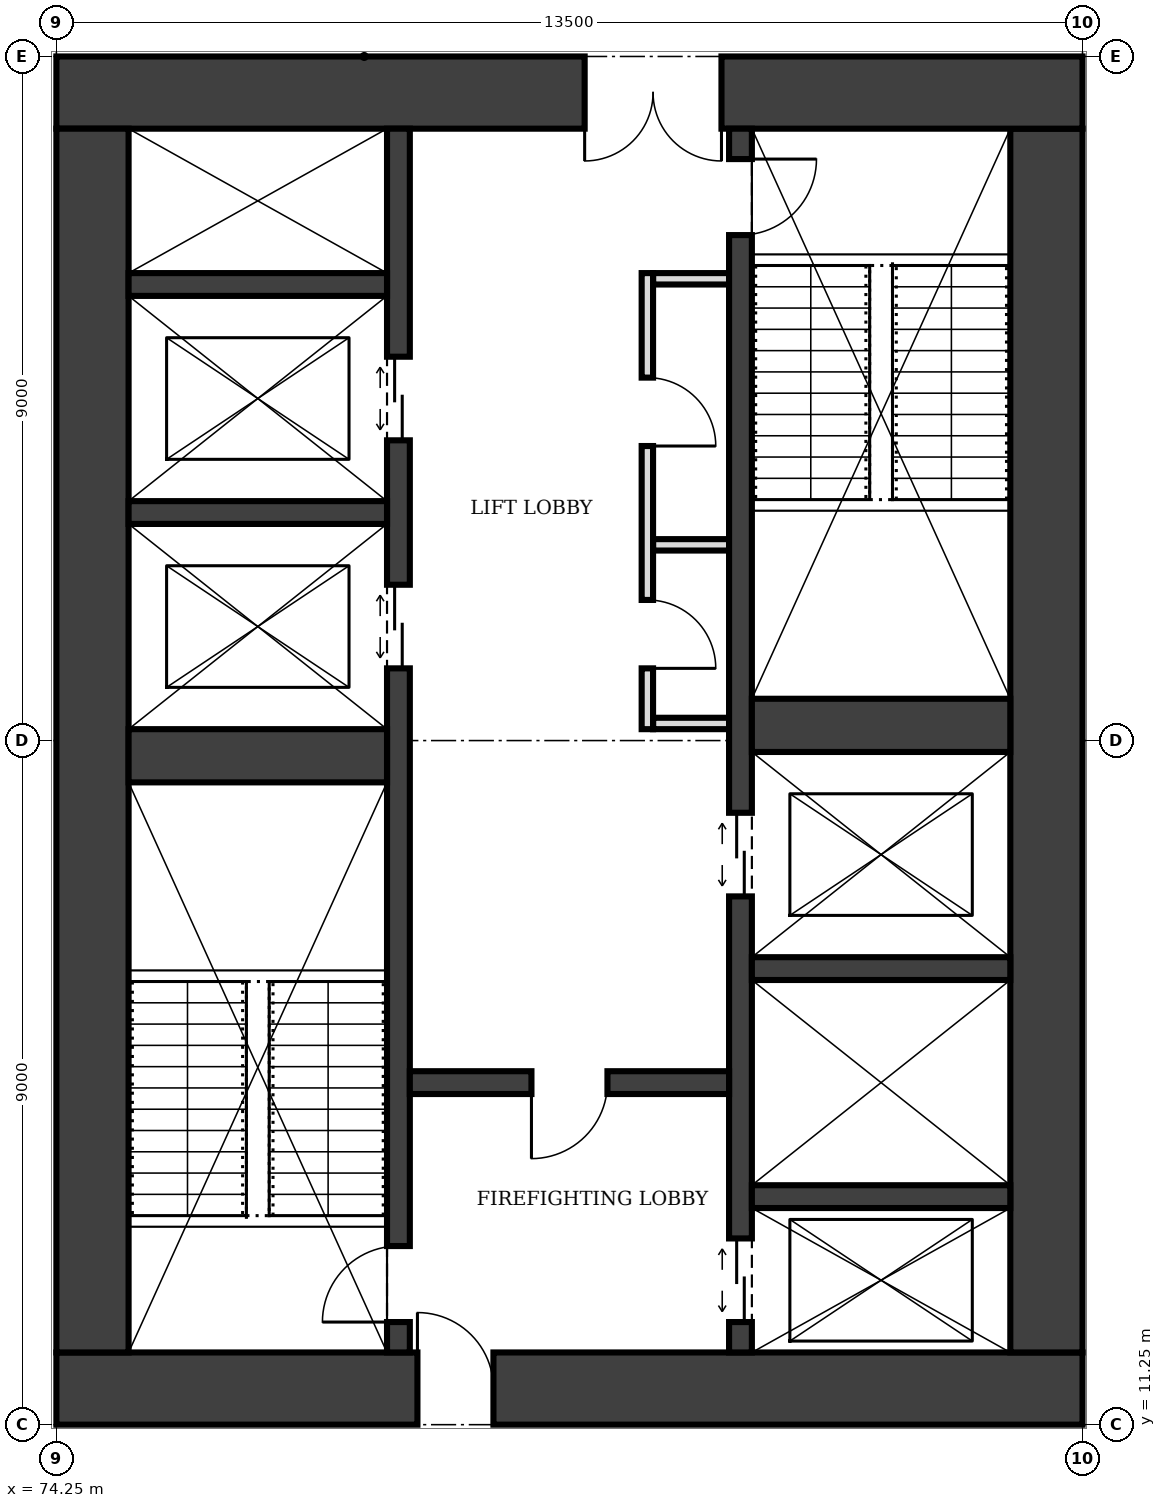
"""IFC4 building model, lengths in metres.
Left out: names, types, materials, properties, quantities, classifications, styles, units other than length and angle.
Written with IfcOpenShell. Run it as: python <this file> out.ifc"""

import sys

from ifc_helpers import new_model, si_unit, direction, frame, frame_2d, origin, place, context, subcontext, project, spatial, rectangle, extrude, element, fill, save


model = new_model("IFC4")
c1 = context("Model", 3, precision=1e-05, world=origin(), true_north=direction((0.0, 1.0)))
c2 = subcontext(c1, "Body", "Model", "MODEL_VIEW")
j1 = project(units=[si_unit("LENGTHUNIT", "METRE"), si_unit("PLANEANGLEUNIT", "RADIAN")], contexts=[c1])
p1 = place(None, origin())
s1 = spatial("IfcSite", under=j1, at=p1, CompositionType="ELEMENT")
p2 = place(p1, origin())
s2 = spatial("IfcBuilding", under=s1, at=p2, CompositionType="ELEMENT")
p3 = place(p2, frame((0.0, 0.0, 33.0)))
s3 = spatial("IfcBuildingStorey", under=s2, at=p3, CompositionType="ELEMENT", Elevation=33.0)
p4 = place(p3, frame((74.25, 11.725, 0.0), z_axis=(0.0, 0.0, 1.0), x_axis=(1.0, 0.0, 0.0)))
e1 = element("IfcWall", 1, at=p4, inside=s3, PredefinedType="SHEAR", context=c2, shape_type="SweptSolid", body=[
    extrude(rectangle(XDim=13.5, YDim=0.95, at=frame_2d((6.75, 0.0))), origin(), (0.0, 0.0, 1.0), 4.0),
])
p5 = place(p4, frame((4.75, 0.0, 0.0)))
e2 = element("IfcOpeningElement", 2, at=p5, cuts=e1, PredefinedType="OPENING", context=c2, shape_type="SweptSolid", body=[
    extrude(rectangle(XDim=1.0, YDim=2.1, at=frame_2d((0.5, 1.05))), frame((0.0, 0.485, 0.0), z_axis=(0.0, -1.0, 0.0), x_axis=(1.0, 0.0, 0.0)), (0.0, 0.0, 1.0), 0.97),
])
p6 = place(p3, frame((87.275, 12.2, 0.0), z_axis=(0.0, 0.0, 1.0), x_axis=(0.0, 1.0, 0.0)))
e3 = element("IfcWall", 3, at=p6, inside=s3, PredefinedType="SHEAR", context=c2, shape_type="SweptSolid", body=[
    extrude(rectangle(XDim=16.1, YDim=0.95, at=frame_2d((8.05, 0.0))), origin(), (0.0, 0.0, 1.0), 4.0),
])
p7 = place(p3, frame((87.75, 28.775, 0.0), z_axis=(0.0, 0.0, 1.0), x_axis=(-1.0, 0.0, 0.0)))
e4 = element("IfcWall", 4, at=p7, inside=s3, PredefinedType="SHEAR", context=c2, shape_type="SweptSolid", body=[
    extrude(rectangle(XDim=13.5, YDim=0.95, at=frame_2d((6.75, 0.0))), origin(), (0.0, 0.0, 1.0), 4.0),
])
p8 = place(p7, frame((4.75, 0.0, 0.0)))
e5 = element("IfcOpeningElement", 5, at=p8, cuts=e4, PredefinedType="OPENING", context=c2, shape_type="SweptSolid", body=[
    extrude(rectangle(XDim=1.8, YDim=2.1, at=frame_2d((0.9, 1.05))), frame((0.0, 0.485, 0.0), z_axis=(0.0, -1.0, 0.0), x_axis=(1.0, 0.0, 0.0)), (0.0, 0.0, 1.0), 0.97),
])
p9 = place(p3, frame((74.725, 28.3, 0.0), z_axis=(0.0, 0.0, 1.0), x_axis=(0.0, -1.0, 0.0)))
e6 = element("IfcWall", 6, at=p9, inside=s3, PredefinedType="SHEAR", context=c2, shape_type="SweptSolid", body=[
    extrude(rectangle(XDim=16.1, YDim=0.95, at=frame_2d((8.05, 0.0))), origin(), (0.0, 0.0, 1.0), 4.0),
])
p10 = place(p3, frame((78.75, 12.2, 0.0), z_axis=(0.0, 0.0, 1.0), x_axis=(0.0, 1.0, 0.0)))
e7 = element("IfcWall", 7, at=p10, inside=s3, PredefinedType="SHEAR", context=c2, shape_type="SweptSolid", body=[
    extrude(rectangle(XDim=16.1, YDim=0.3, at=frame_2d((8.05, 0.0))), origin(), (0.0, 0.0, 1.0), 4.0),
])
p11 = place(p10, frame((0.4, 0.0, 0.0)))
e8 = element("IfcOpeningElement", 8, at=p11, cuts=e7, PredefinedType="OPENING", context=c2, shape_type="SweptSolid", body=[
    extrude(rectangle(XDim=1.0, YDim=2.1, at=frame_2d((0.5, 1.05))), frame((0.0, 0.16, 0.0), z_axis=(0.0, -1.0, 0.0), x_axis=(1.0, 0.0, 0.0)), (0.0, 0.0, 1.0), 0.32),
])
p12 = place(p10, frame((9.0, 0.0, 0.0)))
e9 = element("IfcOpeningElement", 9, at=p12, cuts=e7, PredefinedType="OPENING", context=c2, shape_type="SweptSolid", body=[
    extrude(rectangle(XDim=1.1, YDim=2.1, at=frame_2d((0.55, 1.05))), frame((0.0, 0.16, 0.0), z_axis=(0.0, -1.0, 0.0), x_axis=(1.0, 0.0, 0.0)), (0.0, 0.0, 1.0), 0.32),
])
p13 = place(p10, frame((12.0, 0.0, 0.0)))
e10 = element("IfcOpeningElement", 10, at=p13, cuts=e7, PredefinedType="OPENING", context=c2, shape_type="SweptSolid", body=[
    extrude(rectangle(XDim=1.1, YDim=2.1, at=frame_2d((0.55, 1.05))), frame((0.0, 0.16, 0.0), z_axis=(0.0, -1.0, 0.0), x_axis=(1.0, 0.0, 0.0)), (0.0, 0.0, 1.0), 0.32),
])
p14 = place(p3, frame((83.25, 12.2, 0.0), z_axis=(0.0, 0.0, 1.0), x_axis=(0.0, 1.0, 0.0)))
e11 = element("IfcWall", 11, at=p14, inside=s3, PredefinedType="SHEAR", context=c2, shape_type="SweptSolid", body=[
    extrude(rectangle(XDim=16.1, YDim=0.3, at=frame_2d((8.05, 0.0))), origin(), (0.0, 0.0, 1.0), 4.0),
])
p15 = place(p14, frame((14.7, 0.0, 0.0)))
e12 = element("IfcOpeningElement", 12, at=p15, cuts=e11, PredefinedType="OPENING", context=c2, shape_type="SweptSolid", body=[
    extrude(rectangle(XDim=1.0, YDim=2.1, at=frame_2d((0.5, 1.05))), frame((0.0, 0.16, 0.0), z_axis=(0.0, -1.0, 0.0), x_axis=(1.0, 0.0, 0.0)), (0.0, 0.0, 1.0), 0.32),
])
p16 = place(p14, frame((0.4, 0.0, 0.0)))
e13 = element("IfcOpeningElement", 13, at=p16, cuts=e11, PredefinedType="OPENING", context=c2, shape_type="SweptSolid", body=[
    extrude(rectangle(XDim=1.1, YDim=2.1, at=frame_2d((0.55, 1.05))), frame((0.0, 0.16, 0.0), z_axis=(0.0, -1.0, 0.0), x_axis=(1.0, 0.0, 0.0)), (0.0, 0.0, 1.0), 0.32),
])
p17 = place(p14, frame((6.0, 0.0, 0.0)))
e14 = element("IfcOpeningElement", 14, at=p17, cuts=e11, PredefinedType="OPENING", context=c2, shape_type="SweptSolid", body=[
    extrude(rectangle(XDim=1.1, YDim=2.1, at=frame_2d((0.55, 1.05))), frame((0.0, 0.16, 0.0), z_axis=(0.0, -1.0, 0.0), x_axis=(1.0, 0.0, 0.0)), (0.0, 0.0, 1.0), 0.32),
])
p18 = place(p3, frame((75.2, 20.05, 0.0), z_axis=(0.0, 0.0, 1.0), x_axis=(1.0, 0.0, 0.0)))
e15 = element("IfcWall", 15, at=p18, inside=s3, PredefinedType="SHEAR", context=c2, shape_type="SweptSolid", body=[
    extrude(rectangle(XDim=3.4, YDim=0.7, at=frame_2d((1.7, 0.0))), origin(), (0.0, 0.0, 1.0), 4.0),
])
p19 = place(p3, frame((78.9, 15.75, 0.0), z_axis=(0.0, 0.0, 1.0), x_axis=(1.0, 0.0, 0.0)))
e16 = element("IfcWall", 16, at=p19, inside=s3, PredefinedType="SHEAR", context=c2, shape_type="SweptSolid", body=[
    extrude(rectangle(XDim=4.2, YDim=0.3, at=frame_2d((2.1, 0.0))), origin(), (0.0, 0.0, 1.0), 4.0),
])
p20 = place(p19, frame((1.6, 0.0, 0.0)))
e17 = element("IfcOpeningElement", 17, at=p20, cuts=e16, PredefinedType="OPENING", context=c2, shape_type="SweptSolid", body=[
    extrude(rectangle(XDim=1.0, YDim=2.1, at=frame_2d((0.5, 1.05))), frame((0.0, 0.16, 0.0), z_axis=(0.0, -1.0, 0.0), x_axis=(1.0, 0.0, 0.0)), (0.0, 0.0, 1.0), 0.32),
])
for number, where, z_axis, x_axis in (
    (18, (83.4, 14.25, 0.0), (0.0, 0.0, 1.0), (1.0, 0.0, 0.0)),
    (19, (83.4, 17.25, 0.0), (0.0, 0.0, 1.0), (1.0, 0.0, 0.0)),
):
    element("IfcWall", number, at=place(p3, frame(where, z_axis=z_axis, x_axis=x_axis)), inside=s3, PredefinedType="SHEAR", context=c2, shape_type="SweptSolid", body=[
        extrude(rectangle(XDim=3.4, YDim=0.3, at=frame_2d((1.7, 0.0))), origin(), (0.0, 0.0, 1.0), 4.0),
    ])
p21 = place(p3, frame((83.4, 20.45, 0.0), z_axis=(0.0, 0.0, 1.0), x_axis=(1.0, 0.0, 0.0)))
e20 = element("IfcWall", 20, at=p21, inside=s3, PredefinedType="SHEAR", context=c2, shape_type="SweptSolid", body=[
    extrude(rectangle(XDim=3.4, YDim=0.7, at=frame_2d((1.7, 0.0))), origin(), (0.0, 0.0, 1.0), 4.0),
])
for number, where, z_axis, x_axis in (
    (21, (75.2, 23.25, 0.0), (0.0, 0.0, 1.0), (1.0, 0.0, 0.0)),
    (22, (75.2, 26.25, 0.0), (0.0, 0.0, 1.0), (1.0, 0.0, 0.0)),
):
    element("IfcWall", number, at=place(p3, frame(where, z_axis=z_axis, x_axis=x_axis)), inside=s3, PredefinedType="SHEAR", context=c2, shape_type="SweptSolid", body=[
        extrude(rectangle(XDim=3.4, YDim=0.3, at=frame_2d((1.7, 0.0))), origin(), (0.0, 0.0, 1.0), 4.0),
    ])
p22 = place(p3, frame((82.025, 20.4, 0.0), z_axis=(0.0, 0.0, 1.0), x_axis=(0.0, 1.0, 0.0)))
e23 = element("IfcWall", 23, at=p22, inside=s3, PredefinedType="PARTITIONING", context=c2, shape_type="SweptSolid", body=[
    extrude(rectangle(XDim=6.0, YDim=0.15, at=frame_2d((3.0, 0.0))), origin(), (0.0, 0.0, 1.0), 3.75),
])
p23 = place(p22, frame((0.8, 0.0, 0.0)))
e24 = element("IfcOpeningElement", 24, at=p23, cuts=e23, PredefinedType="OPENING", context=c2, shape_type="SweptSolid", body=[
    extrude(rectangle(XDim=0.9, YDim=2.1, at=frame_2d((0.45, 1.05))), frame((0.0, 0.085, 0.0), z_axis=(0.0, -1.0, 0.0), x_axis=(1.0, 0.0, 0.0)), (0.0, 0.0, 1.0), 0.17),
])
p24 = place(p22, frame((3.725, 0.0, 0.0)))
e25 = element("IfcOpeningElement", 25, at=p24, cuts=e23, PredefinedType="OPENING", context=c2, shape_type="SweptSolid", body=[
    extrude(rectangle(XDim=0.9, YDim=2.1, at=frame_2d((0.45, 1.05))), frame((0.0, 0.085, 0.0), z_axis=(0.0, -1.0, 0.0), x_axis=(1.0, 0.0, 0.0)), (0.0, 0.0, 1.0), 0.17),
])
for number, where, z_axis, x_axis in (
    (26, (82.1, 20.475, 0.0), (0.0, 0.0, 1.0), (1.0, 0.0, 0.0)),
    (27, (82.1, 22.825, 0.0), (0.0, 0.0, 1.0), (1.0, 0.0, 0.0)),
    (28, (82.1, 26.325, 0.0), (0.0, 0.0, 1.0), (1.0, 0.0, 0.0)),
):
    element("IfcWall", number, at=place(p3, frame(where, z_axis=z_axis, x_axis=x_axis)), inside=s3, PredefinedType="PARTITIONING", context=c2, shape_type="SweptSolid", body=[
        extrude(rectangle(XDim=1.0, YDim=0.15, at=frame_2d((0.5, 0.0))), origin(), (0.0, 0.0, 1.0), 3.75),
    ])
p25 = place(p5, origin())
e29 = element("IfcDoor", 29, at=p25, inside=s3, OperationType="SINGLE_SWING_LEFT", PredefinedType="DOOR", context=c2, shape_type="SweptSolid", body=[
    extrude(rectangle(XDim=1.0, YDim=2.1, at=frame_2d((0.5, 1.05))), frame((0.0, 0.025, 0.0), z_axis=(0.0, -1.0, 0.0), x_axis=(1.0, 0.0, 0.0)), (0.0, 0.0, 1.0), 0.05),
])
fill(e2, e29)
p26 = place(p8, origin())
e30 = element("IfcDoor", 30, at=p26, inside=s3, OperationType="DOUBLE_DOOR_SINGLE_SWING", PredefinedType="DOOR", context=c2, shape_type="SweptSolid", body=[
    extrude(rectangle(XDim=1.8, YDim=2.1, at=frame_2d((0.9, 1.05))), frame((0.0, 0.025, 0.0), z_axis=(0.0, -1.0, 0.0), x_axis=(1.0, 0.0, 0.0)), (0.0, 0.0, 1.0), 0.05),
])
fill(e5, e30)
p27 = place(p20, frame((1.0, 0.0, 0.0), z_axis=(0.0, 0.0, 1.0), x_axis=(-1.0, 0.0, 0.0)))
e31 = element("IfcDoor", 31, at=p27, inside=s3, OperationType="SINGLE_SWING_RIGHT", PredefinedType="DOOR", context=c2, shape_type="SweptSolid", body=[
    extrude(rectangle(XDim=1.0, YDim=2.1, at=frame_2d((0.5, 1.05))), frame((0.0, 0.025, 0.0), z_axis=(0.0, -1.0, 0.0), x_axis=(1.0, 0.0, 0.0)), (0.0, 0.0, 1.0), 0.05),
])
fill(e17, e31)
p28 = place(p11, origin())
e32 = element("IfcDoor", 32, at=p28, inside=s3, OperationType="SINGLE_SWING_LEFT", PredefinedType="DOOR", context=c2, shape_type="SweptSolid", body=[
    extrude(rectangle(XDim=1.0, YDim=2.1, at=frame_2d((0.5, 1.05))), frame((0.0, 0.025, 0.0), z_axis=(0.0, -1.0, 0.0), x_axis=(1.0, 0.0, 0.0)), (0.0, 0.0, 1.0), 0.05),
])
fill(e8, e32)
p29 = place(p15, frame((1.0, 0.0, 0.0), z_axis=(0.0, 0.0, 1.0), x_axis=(-1.0, 0.0, 0.0)))
e33 = element("IfcDoor", 33, at=p29, inside=s3, OperationType="SINGLE_SWING_LEFT", PredefinedType="DOOR", context=c2, shape_type="SweptSolid", body=[
    extrude(rectangle(XDim=1.0, YDim=2.1, at=frame_2d((0.5, 1.05))), frame((0.0, 0.025, 0.0), z_axis=(0.0, -1.0, 0.0), x_axis=(1.0, 0.0, 0.0)), (0.0, 0.0, 1.0), 0.05),
])
fill(e12, e33)
p30 = place(p16, origin())
e34 = element("IfcDoor", 34, at=p30, inside=s3, OperationType="DOUBLE_DOOR_SLIDING", PredefinedType="DOOR", context=c2, shape_type="SweptSolid", body=[
    extrude(rectangle(XDim=1.1, YDim=2.1, at=frame_2d((0.55, 1.05))), frame((0.0, 0.025, 0.0), z_axis=(0.0, -1.0, 0.0), x_axis=(1.0, 0.0, 0.0)), (0.0, 0.0, 1.0), 0.05),
])
fill(e13, e34)
p31 = place(p12, origin())
e35 = element("IfcDoor", 35, at=p31, inside=s3, OperationType="DOUBLE_DOOR_SLIDING", PredefinedType="DOOR", context=c2, shape_type="SweptSolid", body=[
    extrude(rectangle(XDim=1.1, YDim=2.1, at=frame_2d((0.55, 1.05))), frame((0.0, 0.025, 0.0), z_axis=(0.0, -1.0, 0.0), x_axis=(1.0, 0.0, 0.0)), (0.0, 0.0, 1.0), 0.05),
])
fill(e9, e35)
p32 = place(p13, origin())
e36 = element("IfcDoor", 36, at=p32, inside=s3, OperationType="DOUBLE_DOOR_SLIDING", PredefinedType="DOOR", context=c2, shape_type="SweptSolid", body=[
    extrude(rectangle(XDim=1.1, YDim=2.1, at=frame_2d((0.55, 1.05))), frame((0.0, 0.025, 0.0), z_axis=(0.0, -1.0, 0.0), x_axis=(1.0, 0.0, 0.0)), (0.0, 0.0, 1.0), 0.05),
])
fill(e10, e36)
p33 = place(p17, origin())
e37 = element("IfcDoor", 37, at=p33, inside=s3, OperationType="DOUBLE_DOOR_SLIDING", PredefinedType="DOOR", context=c2, shape_type="SweptSolid", body=[
    extrude(rectangle(XDim=1.1, YDim=2.1, at=frame_2d((0.55, 1.05))), frame((0.0, 0.025, 0.0), z_axis=(0.0, -1.0, 0.0), x_axis=(1.0, 0.0, 0.0)), (0.0, 0.0, 1.0), 0.05),
])
fill(e14, e37)
p34 = place(p23, frame((0.9, 0.0, 0.0), z_axis=(0.0, 0.0, 1.0), x_axis=(-1.0, 0.0, 0.0)))
e38 = element("IfcDoor", 38, at=p34, inside=s3, OperationType="SINGLE_SWING_RIGHT", PredefinedType="DOOR", context=c2, shape_type="SweptSolid", body=[
    extrude(rectangle(XDim=0.9, YDim=2.1, at=frame_2d((0.45, 1.05))), frame((0.0, 0.025, 0.0), z_axis=(0.0, -1.0, 0.0), x_axis=(1.0, 0.0, 0.0)), (0.0, 0.0, 1.0), 0.05),
])
fill(e24, e38)
p35 = place(p24, frame((0.9, 0.0, 0.0), z_axis=(0.0, 0.0, 1.0), x_axis=(-1.0, 0.0, 0.0)))
e39 = element("IfcDoor", 39, at=p35, inside=s3, OperationType="SINGLE_SWING_RIGHT", PredefinedType="DOOR", context=c2, shape_type="SweptSolid", body=[
    extrude(rectangle(XDim=0.9, YDim=2.1, at=frame_2d((0.45, 1.05))), frame((0.0, 0.025, 0.0), z_axis=(0.0, -1.0, 0.0), x_axis=(1.0, 0.0, 0.0)), (0.0, 0.0, 1.0), 0.05),
])
fill(e25, e39)
save(model, sys.argv[1])
